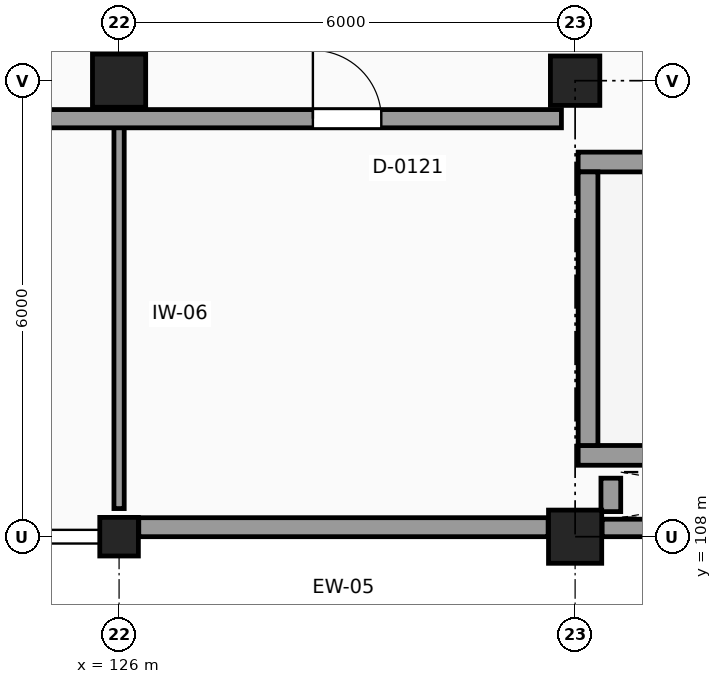
"""IFC4 building model, lengths in metres.
Left out: names, types, materials, properties, quantities, classifications, styles, units other than length and angle.
Written with IfcOpenShell. Run it as: python <this file> out.ifc"""

import sys

from ifc_helpers import new_model, si_unit, direction, frame, frame_2d, origin, origin_2d, place, context, subcontext, project, spatial, rectangle, hollow_circle, extrude, element, fill, save


model = new_model("IFC4")
c1 = context("Model", 3, precision=1e-05, world=origin(), true_north=direction((0.0, 1.0)))
c2 = subcontext(c1, "Body", "Model", "MODEL_VIEW")
j1 = project(units=[si_unit("LENGTHUNIT", "METRE"), si_unit("PLANEANGLEUNIT", "RADIAN")], contexts=[c1])
p1 = place(None, origin())
s1 = spatial("IfcSite", under=j1, at=p1, CompositionType="ELEMENT")
p2 = place(p1, origin())
s2 = spatial("IfcBuilding", under=s1, at=p2, CompositionType="ELEMENT")
p3 = place(p2, frame((0.0, 0.0, 15.0)))
s3 = spatial("IfcBuildingStorey", under=s2, at=p3, CompositionType="ELEMENT", Elevation=15.0)
p4 = place(p3, frame((126.0, 108.0, 0.0), z_axis=(0.0, 0.0, 1.0), x_axis=(1.0, 0.0, 0.0)))
e1 = element("IfcColumn", 1, at=p4, inside=s3, PredefinedType="COLUMN", context=c2, shape_type="SweptSolid", body=[
    extrude(hollow_circle(Radius=0.254, WallThickness=0.025, at=origin_2d()), origin(), (0.0, 0.0, 1.0), 4.8),
])
for number, where, z_axis, x_axis in (
    (2, (126.0, 114.0, 0.0), (0.0, 0.0, 1.0), (1.0, 0.0, 0.0)),
    (3, (132.0, 108.0, 0.0), (0.0, 0.0, 1.0), (1.0, 0.0, 0.0)),
):
    element("IfcColumn", number, at=place(p3, frame(where, z_axis=z_axis, x_axis=x_axis)), inside=s3, PredefinedType="COLUMN", context=c2, shape_type="SweptSolid", body=[
        extrude(rectangle(XDim=0.7, YDim=0.7, at=origin_2d()), origin(), (0.0, 0.0, 1.0), 4.8),
    ])
p5 = place(p3, frame((132.0, 114.0, 0.0), z_axis=(0.0, 0.0, 1.0), x_axis=(1.0, 0.0, 0.0)))
e4 = element("IfcColumn", 4, at=p5, inside=s3, PredefinedType="COLUMN", context=c2, shape_type="SweptSolid", body=[
    extrude(rectangle(XDim=0.65, YDim=0.65, at=origin_2d()), origin(), (0.0, 0.0, 1.0), 4.8),
])
p6 = place(p3, frame((126.259, 108.125, 0.0), z_axis=(0.0, 0.0, 1.0), x_axis=(1.0, 0.0, 0.0)))
e5 = element("IfcWall", 5, at=p6, inside=s3, PredefinedType="SOLIDWALL", context=c2, shape_type="SweptSolid", body=[
    extrude(rectangle(XDim=5.386, YDim=0.25, at=frame_2d((2.693, 0.0))), origin(), (0.0, 0.0, 1.0), 3.7),
])
p7 = place(p3, frame((132.355, 108.115, 0.0), z_axis=(0.0, 0.0, 1.0), x_axis=(1.0, 0.0, 0.0)))
e6 = element("IfcWall", 6, at=p7, inside=s3, PredefinedType="SOLIDWALL", context=c2, shape_type="SweptSolid", body=[
    extrude(rectangle(XDim=5.315, YDim=0.23, at=frame_2d((2.657, 0.0))), origin(), (0.0, 0.0, 1.0), 4.45),
])
for number, where, z_axis, x_axis in (
    (7, (132.04, 109.07, 0.0), (0.0, 0.0, 1.0), (1.0, 0.0, 0.0)),
    (8, (132.04, 112.93, 0.0), (0.0, 0.0, 1.0), (1.0, 0.0, 0.0)),
):
    element("IfcWall", number, at=place(p3, frame(where, z_axis=z_axis, x_axis=x_axis)), inside=s3, PredefinedType="SHEAR", context=c2, shape_type="SweptSolid", body=[
        extrude(rectangle(XDim=10.72, YDim=0.26, at=frame_2d((5.36, 0.0))), origin(), (0.0, 0.0, 1.0), 4.8),
    ])
p8 = place(p3, frame((132.17, 109.2, 0.0), z_axis=(0.0, 0.0, 1.0), x_axis=(0.0, 1.0, 0.0)))
e9 = element("IfcWall", 9, at=p8, inside=s3, PredefinedType="SHEAR", context=c2, shape_type="SweptSolid", body=[
    extrude(rectangle(XDim=3.6, YDim=0.26, at=frame_2d((1.8, 0.0))), origin(), (0.0, 0.0, 1.0), 4.8),
])
p9 = place(p3, frame((132.47, 108.33, 0.0), z_axis=(0.0, 0.0, 1.0), x_axis=(0.0, 1.0, 0.0)))
e10 = element("IfcWall", 10, at=p9, inside=s3, PredefinedType="SHEAR", context=c2, shape_type="SweptSolid", body=[
    extrude(rectangle(XDim=0.44, YDim=0.26, at=frame_2d((0.22, 0.0))), origin(), (0.0, 0.0, 1.0), 4.8),
])
p10 = place(p3, frame((126.0, 108.37, 0.0), z_axis=(0.0, 0.0, 1.0), x_axis=(0.0, 1.0, 0.0)))
e11 = element("IfcWall", 11, at=p10, inside=s3, PredefinedType="PARTITIONING", context=c2, shape_type="SweptSolid", body=[
    extrude(rectangle(XDim=5.13, YDim=0.135, at=frame_2d((2.565, 0.0))), origin(), (0.0, 0.0, 1.0), 3.65),
])
p11 = place(p3, frame((120.555, 113.5, 0.0), z_axis=(0.0, 0.0, 1.0), x_axis=(1.0, 0.0, 0.0)))
e12 = element("IfcWall", 12, at=p11, inside=s3, PredefinedType="PARTITIONING", context=c2, shape_type="SweptSolid", body=[
    extrude(rectangle(XDim=11.265, YDim=0.24, at=frame_2d((5.633, 0.0))), origin(), (0.0, 0.0, 1.0), 4.45),
])
p12 = place(p11, frame((1.995, 0.0, 0.0)))
e13 = element("IfcOpeningElement", 13, at=p12, cuts=e12, PredefinedType="OPENING", context=c2, shape_type="SweptSolid", body=[
    extrude(rectangle(XDim=0.9, YDim=2.1, at=frame_2d((0.45, 1.05))), frame((0.0, 0.13, 0.0), z_axis=(0.0, -1.0, 0.0), x_axis=(1.0, 0.0, 0.0)), (0.0, 0.0, 1.0), 0.26),
])
p13 = place(p11, frame((7.995, 0.0, 0.0)))
e14 = element("IfcOpeningElement", 14, at=p13, cuts=e12, PredefinedType="OPENING", context=c2, shape_type="SweptSolid", body=[
    extrude(rectangle(XDim=0.9, YDim=2.1, at=frame_2d((0.45, 1.05))), frame((0.0, 0.13, 0.0), z_axis=(0.0, -1.0, 0.0), x_axis=(1.0, 0.0, 0.0)), (0.0, 0.0, 1.0), 0.26),
])
p14 = place(p13, origin())
e15 = element("IfcDoor", 15, at=p14, inside=s3, OperationType="SINGLE_SWING_LEFT", PredefinedType="DOOR", context=c2, shape_type="SweptSolid", body=[
    extrude(rectangle(XDim=0.9, YDim=2.1, at=frame_2d((0.45, 1.05))), frame((0.0, 0.025, 0.0), z_axis=(0.0, -1.0, 0.0), x_axis=(1.0, 0.0, 0.0)), (0.0, 0.0, 1.0), 0.05),
])
fill(e14, e15)
save(model, sys.argv[1])
